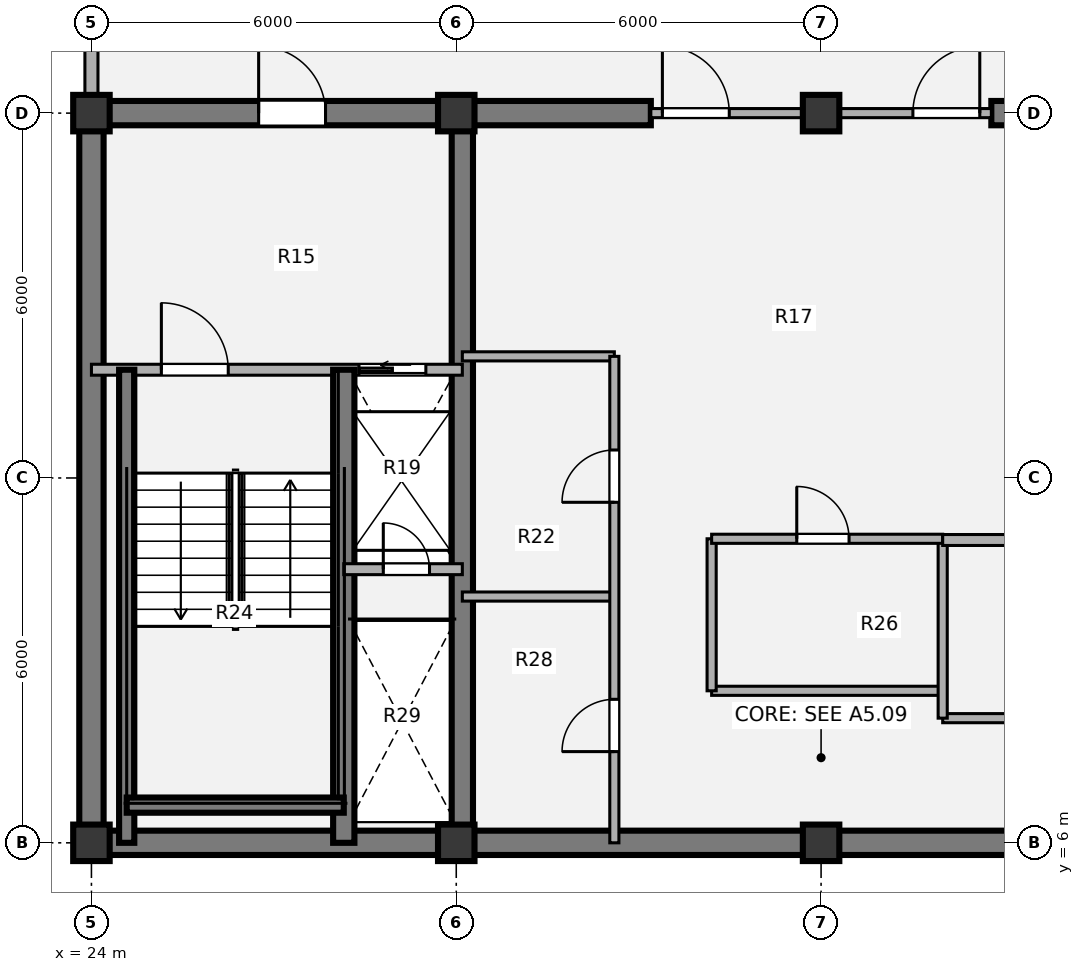
"""IFC4 building model, lengths in metres.
Left out: names, types, materials, properties, quantities, classifications, styles, units other than length and angle.
Written with IfcOpenShell. Run it as: python <this file> out.ifc"""

import sys

from ifc_helpers import new_model, si_unit, direction, frame, frame_2d, origin, origin_2d, place, context, subcontext, project, spatial, rectangle, extrude, source, transform, mapped, element, fill, save


model = new_model("IFC4")
c1 = context("Model", 3, precision=1e-05, world=origin(), true_north=direction((0.0, 1.0)))
c2 = subcontext(c1, "Body", "Model", "MODEL_VIEW")
j1 = project(units=[si_unit("LENGTHUNIT", "METRE"), si_unit("PLANEANGLEUNIT", "RADIAN")], contexts=[c1])
p1 = place(None, origin())
s1 = spatial("IfcSite", under=j1, at=p1, CompositionType="ELEMENT")
p2 = place(p1, origin())
s2 = spatial("IfcBuilding", under=s1, at=p2, CompositionType="ELEMENT")
p3 = place(p2, frame((0.0, 0.0, 279.72)))
s3 = spatial("IfcBuildingStorey", under=s2, at=p3, CompositionType="ELEMENT", Elevation=279.72)
m1 = source(origin(), c2, "Body", "SweptSolid", [
    extrude(rectangle(XDim=0.6, YDim=0.6, at=origin_2d()), origin(), (0.0, 0.0, 1.0), 3.78),
])
for number, where, z_axis, x_axis in (
    (1, (24.0, 6.0, 0.0), (0.0, 0.0, 1.0), (1.0, 0.0, 0.0)),
    (2, (30.0, 6.0, 0.0), (0.0, 0.0, 1.0), (1.0, 0.0, 0.0)),
    (3, (36.0, 6.0, 0.0), (0.0, 0.0, 1.0), (1.0, 0.0, 0.0)),
    (4, (24.0, 18.0, 0.0), (0.0, 0.0, 1.0), (1.0, 0.0, 0.0)),
    (5, (30.0, 18.0, 0.0), (0.0, 0.0, 1.0), (1.0, 0.0, 0.0)),
    (6, (36.0, 18.0, 0.0), (0.0, 0.0, 1.0), (1.0, 0.0, 0.0)),
):
    element("IfcColumn", number, at=place(p3, frame(where, z_axis=z_axis, x_axis=x_axis)), inside=s3, PredefinedType="COLUMN", context=c2, shape_type="MappedRepresentation", body=[
        mapped(m1, transform((0.0, 0.0, 0.0), x_axis=(1.0, 0.0, 0.0), y_axis=(0.0, 1.0, 0.0), z_axis=(0.0, 0.0, 1.0), scale=1.0)),
    ])
p4 = place(p3, frame((48.2, 6.0, 0.0), z_axis=(0.0, 0.0, 1.0), x_axis=(-1.0, 0.0, 0.0)))
e7 = element("IfcWall", 7, at=p4, inside=s3, PredefinedType="SHEAR", context=c2, shape_type="SweptSolid", body=[
    extrude(rectangle(XDim=24.4, YDim=0.4, at=frame_2d((12.2, 0.0))), origin(), (0.0, 0.0, 1.0), 3.78),
])
p5 = place(p3, frame((24.0, 6.0, 0.0), z_axis=(0.0, 0.0, 1.0), x_axis=(0.0, 1.0, 0.0)))
e8 = element("IfcWall", 8, at=p5, inside=s3, PredefinedType="SHEAR", context=c2, shape_type="SweptSolid", body=[
    extrude(rectangle(XDim=12.0, YDim=0.4, at=frame_2d((6.0, 0.0))), origin(), (0.0, 0.0, 1.0), 3.78),
])
p6 = place(p3, frame((23.8, 18.0, 0.0), z_axis=(0.0, 0.0, 1.0), x_axis=(1.0, 0.0, 0.0)))
e9 = element("IfcWall", 9, at=p6, inside=s3, PredefinedType="SHEAR", context=c2, shape_type="SweptSolid", body=[
    extrude(rectangle(XDim=9.4, YDim=0.4, at=frame_2d((4.7, 0.0))), origin(), (0.0, 0.0, 1.0), 3.78),
])
p7 = place(p6, frame((2.95, 0.0, 0.0)))
e10 = element("IfcOpeningElement", 10, at=p7, cuts=e9, PredefinedType="OPENING", context=c2, shape_type="SweptSolid", body=[
    extrude(rectangle(XDim=1.1, YDim=2.1, at=origin_2d()), frame((0.55, 0.21, 1.05), z_axis=(0.0, -1.0, 0.0), x_axis=(1.0, 0.0, 0.0)), (0.0, 0.0, 1.0), 0.42),
])
p8 = place(p3, frame((38.8, 18.0, 0.0), z_axis=(0.0, 0.0, 1.0), x_axis=(1.0, 0.0, 0.0)))
e11 = element("IfcWall", 11, at=p8, inside=s3, PredefinedType="SHEAR", context=c2, shape_type="SweptSolid", body=[
    extrude(rectangle(XDim=9.4, YDim=0.4, at=frame_2d((4.7, 0.0))), origin(), (0.0, 0.0, 1.0), 3.78),
])
p9 = place(p8, frame((5.45, 0.0, 0.0)))
e12 = element("IfcOpeningElement", 12, at=p9, cuts=e11, PredefinedType="OPENING", context=c2, shape_type="SweptSolid", body=[
    extrude(rectangle(XDim=1.1, YDim=2.1, at=origin_2d()), frame((0.55, 0.21, 1.05), z_axis=(0.0, -1.0, 0.0), x_axis=(1.0, 0.0, 0.0)), (0.0, 0.0, 1.0), 0.42),
])
p10 = place(p3, frame((30.1, 6.0, 0.0), z_axis=(0.0, 0.0, 1.0), x_axis=(0.0, 1.0, 0.0)))
e13 = element("IfcWall", 13, at=p10, inside=s3, PredefinedType="SHEAR", context=c2, shape_type="SweptSolid", body=[
    extrude(rectangle(XDim=12.0, YDim=0.35, at=frame_2d((6.0, 0.0))), origin(), (0.0, 0.0, 1.0), 3.78),
])
p11 = place(p3, frame((24.0, 18.28, 0.0), z_axis=(0.0, 0.0, 1.0), x_axis=(0.0, 1.0, 0.0)))
e14 = element("IfcWall", 14, at=p11, inside=s3, PredefinedType="SOLIDWALL", context=c2, shape_type="SweptSolid", body=[
    extrude(rectangle(XDim=2.77, YDim=0.215, at=frame_2d((1.385, 0.0))), origin(), (0.0, 0.0, 1.0), 2.718),
])
p12 = place(p3, frame((30.1, 14.0, 0.0), z_axis=(0.0, 0.0, 1.0), x_axis=(1.0, 0.0, 0.0)))
e15 = element("IfcWall", 15, at=p12, inside=s3, PredefinedType="PARTITIONING", context=c2, shape_type="SweptSolid", body=[
    extrude(rectangle(XDim=2.5, YDim=0.15, at=frame_2d((1.25, 0.0))), origin(), (0.0, 0.0, 1.0), 3.5),
])
p13 = place(p3, frame((34.2, 8.5, 0.0), z_axis=(0.0, 0.0, 1.0), x_axis=(1.0, 0.0, 0.0)))
e16 = element("IfcWall", 16, at=p13, inside=s3, PredefinedType="PARTITIONING", context=c2, shape_type="SweptSolid", body=[
    extrude(rectangle(XDim=3.8, YDim=0.15, at=frame_2d((1.9, 0.0))), origin(), (0.0, 0.0, 1.0), 3.5),
])
p14 = place(p3, frame((38.0, 8.05, 0.0), z_axis=(0.0, 0.0, 1.0), x_axis=(1.0, 0.0, 0.0)))
e17 = element("IfcWall", 17, at=p14, inside=s3, PredefinedType="PARTITIONING", context=c2, shape_type="SweptSolid", body=[
    extrude(rectangle(XDim=3.9, YDim=0.15, at=frame_2d((1.95, 0.0))), origin(), (0.0, 0.0, 1.0), 3.5),
])
p15 = place(p14, frame((1.45, 0.0, 0.0)))
e18 = element("IfcOpeningElement", 18, at=p15, cuts=e17, PredefinedType="OPENING", context=c2, shape_type="SweptSolid", body=[
    extrude(rectangle(XDim=0.86, YDim=2.1, at=origin_2d()), frame((0.43, 0.085, 1.05), z_axis=(0.0, -1.0, 0.0), x_axis=(1.0, 0.0, 0.0)), (0.0, 0.0, 1.0), 0.17),
])
p16 = place(p3, frame((34.2, 8.5, 0.0), z_axis=(0.0, 0.0, 1.0), x_axis=(0.0, 1.0, 0.0)))
e19 = element("IfcWall", 19, at=p16, inside=s3, PredefinedType="PARTITIONING", context=c2, shape_type="SweptSolid", body=[
    extrude(rectangle(XDim=2.5, YDim=0.15, at=frame_2d((1.25, 0.0))), origin(), (0.0, 0.0, 1.0), 3.5),
])
p17 = place(p3, frame((38.0, 8.05, 0.0), z_axis=(0.0, 0.0, 1.0), x_axis=(0.0, 1.0, 0.0)))
e20 = element("IfcWall", 20, at=p17, inside=s3, PredefinedType="PARTITIONING", context=c2, shape_type="SweptSolid", body=[
    extrude(rectangle(XDim=2.95, YDim=0.15, at=frame_2d((1.475, 0.0))), origin(), (0.0, 0.0, 1.0), 3.5),
])
p18 = place(p3, frame((34.2, 11.0, 0.0), z_axis=(0.0, 0.0, 1.0), x_axis=(1.0, 0.0, 0.0)))
e21 = element("IfcWall", 21, at=p18, inside=s3, PredefinedType="PARTITIONING", context=c2, shape_type="SweptSolid", body=[
    extrude(rectangle(XDim=3.8, YDim=0.15, at=frame_2d((1.9, 0.0))), origin(), (0.0, 0.0, 1.0), 3.5),
])
p19 = place(p18, frame((1.4, 0.0, 0.0)))
e22 = element("IfcOpeningElement", 22, at=p19, cuts=e21, PredefinedType="OPENING", context=c2, shape_type="SweptSolid", body=[
    extrude(rectangle(XDim=0.86, YDim=2.1, at=origin_2d()), frame((0.43, 0.085, 1.05), z_axis=(0.0, -1.0, 0.0), x_axis=(1.0, 0.0, 0.0)), (0.0, 0.0, 1.0), 0.17),
])
p20 = place(p3, frame((38.0, 10.98, 0.0), z_axis=(0.0, 0.0, 1.0), x_axis=(1.0, 0.0, 0.0)))
e23 = element("IfcWall", 23, at=p20, inside=s3, PredefinedType="PARTITIONING", context=c2, shape_type="SweptSolid", body=[
    extrude(rectangle(XDim=3.9, YDim=0.18, at=frame_2d((1.95, 0.0))), origin(), (0.0, 0.0, 1.0), 3.5),
])
p21 = place(p3, frame((30.1, 10.05, 0.0), z_axis=(0.0, 0.0, 1.0), x_axis=(1.0, 0.0, 0.0)))
e24 = element("IfcWall", 24, at=p21, inside=s3, PredefinedType="PARTITIONING", context=c2, shape_type="SweptSolid", body=[
    extrude(rectangle(XDim=2.5, YDim=0.15, at=frame_2d((1.25, 0.0))), origin(), (0.0, 0.0, 1.0), 3.5),
])
p22 = place(p3, frame((32.6, 6.0, 0.0), z_axis=(0.0, 0.0, 1.0), x_axis=(0.0, 1.0, 0.0)))
e25 = element("IfcWall", 25, at=p22, inside=s3, PredefinedType="PARTITIONING", context=c2, shape_type="SweptSolid", body=[
    extrude(rectangle(XDim=8.0, YDim=0.15, at=frame_2d((4.0, 0.0))), origin(), (0.0, 0.0, 1.0), 3.5),
])
p23 = place(p22, frame((1.5, 0.0, 0.0)))
e26 = element("IfcOpeningElement", 26, at=p23, cuts=e25, PredefinedType="OPENING", context=c2, shape_type="SweptSolid", body=[
    extrude(rectangle(XDim=0.86, YDim=2.1, at=origin_2d()), frame((0.43, 0.085, 1.05), z_axis=(0.0, -1.0, 0.0), x_axis=(1.0, 0.0, 0.0)), (0.0, 0.0, 1.0), 0.17),
])
p24 = place(p22, frame((5.6, 0.0, 0.0)))
e27 = element("IfcOpeningElement", 27, at=p24, cuts=e25, PredefinedType="OPENING", context=c2, shape_type="SweptSolid", body=[
    extrude(rectangle(XDim=0.86, YDim=2.1, at=origin_2d()), frame((0.43, 0.085, 1.05), z_axis=(0.0, -1.0, 0.0), x_axis=(1.0, 0.0, 0.0)), (0.0, 0.0, 1.0), 0.17),
])
p25 = place(p3, frame((33.2, 18.0, 0.0), z_axis=(0.0, 0.0, 1.0), x_axis=(1.0, 0.0, 0.0)))
e28 = element("IfcWall", 28, at=p25, inside=s3, PredefinedType="PARTITIONING", context=c2, shape_type="SweptSolid", body=[
    extrude(rectangle(XDim=5.6, YDim=0.15, at=frame_2d((2.8, 0.0))), origin(), (0.0, 0.0, 1.0), 2.515),
])
p26 = place(p25, frame((0.19, 0.0, 0.0)))
e29 = element("IfcOpeningElement", 29, at=p26, cuts=e28, PredefinedType="OPENING", context=c2, shape_type="SweptSolid", body=[
    extrude(rectangle(XDim=1.1, YDim=2.1, at=origin_2d()), frame((0.55, 0.085, 1.05), z_axis=(0.0, -1.0, 0.0), x_axis=(1.0, 0.0, 0.0)), (0.0, 0.0, 1.0), 0.17),
])
p27 = place(p25, frame((4.31, 0.0, 0.0)))
e30 = element("IfcOpeningElement", 30, at=p27, cuts=e28, PredefinedType="OPENING", context=c2, shape_type="SweptSolid", body=[
    extrude(rectangle(XDim=1.1, YDim=2.1, at=origin_2d()), frame((0.55, 0.085, 1.05), z_axis=(0.0, -1.0, 0.0), x_axis=(1.0, 0.0, 0.0)), (0.0, 0.0, 1.0), 0.17),
])
p28 = place(p3, frame((24.0, 13.78, 0.0), z_axis=(0.0, 0.0, 1.0), x_axis=(1.0, 0.0, 0.0)))
e31 = element("IfcWall", 31, at=p28, inside=s3, PredefinedType="PARTITIONING", context=c2, shape_type="SweptSolid", body=[
    extrude(rectangle(XDim=6.1, YDim=0.18, at=frame_2d((3.05, 0.0))), origin(), (0.0, 0.0, 1.0), 3.5),
])
p29 = place(p28, frame((1.15, 0.0, 0.0)))
e32 = element("IfcOpeningElement", 32, at=p29, cuts=e31, PredefinedType="OPENING", context=c2, shape_type="SweptSolid", body=[
    extrude(rectangle(XDim=1.1, YDim=2.1, at=origin_2d()), frame((0.55, 0.1, 1.05), z_axis=(0.0, -1.0, 0.0), x_axis=(1.0, 0.0, 0.0)), (0.0, 0.0, 1.0), 0.2),
])
p30 = place(p28, frame((4.4, 0.0, 0.0)))
e33 = element("IfcOpeningElement", 33, at=p30, cuts=e31, PredefinedType="OPENING", context=c2, shape_type="SweptSolid", body=[
    extrude(rectangle(XDim=1.1, YDim=2.1, at=origin_2d()), frame((0.55, 0.1, 1.05), z_axis=(0.0, -1.0, 0.0), x_axis=(1.0, 0.0, 0.0)), (0.0, 0.0, 1.0), 0.2),
])
p31 = place(p3, frame((28.15, 6.0, 0.0), z_axis=(0.0, 0.0, 1.0), x_axis=(0.0, 1.0, 0.0)))
e34 = element("IfcWall", 34, at=p31, inside=s3, PredefinedType="SHEAR", context=c2, shape_type="SweptSolid", body=[
    extrude(rectangle(XDim=7.78, YDim=0.35, at=frame_2d((3.89, 0.0))), origin(), (0.0, 0.0, 1.0), 3.85),
])
p32 = place(p3, frame((24.58, 6.0, 0.0), z_axis=(0.0, 0.0, 1.0), x_axis=(0.0, 1.0, 0.0)))
e35 = element("IfcWall", 35, at=p32, inside=s3, PredefinedType="SHEAR", context=c2, shape_type="SweptSolid", body=[
    extrude(rectangle(XDim=7.78, YDim=0.25, at=frame_2d((3.89, 0.0))), origin(), (0.0, 0.0, 1.0), 3.85),
])
p33 = place(p3, frame((24.58, 6.62, 0.0), z_axis=(0.0, 0.0, 1.0), x_axis=(1.0, 0.0, 0.0)))
e36 = element("IfcWall", 36, at=p33, inside=s3, PredefinedType="SHEAR", context=c2, shape_type="SweptSolid", body=[
    extrude(rectangle(XDim=3.57, YDim=0.25, at=frame_2d((1.785, 0.0))), origin(), (0.0, 0.0, 1.0), 3.85),
])
p34 = place(p3, frame((28.15, 10.5, 0.0), z_axis=(0.0, 0.0, 1.0), x_axis=(1.0, 0.0, 0.0)))
e37 = element("IfcWall", 37, at=p34, inside=s3, PredefinedType="PARTITIONING", context=c2, shape_type="SweptSolid", body=[
    extrude(rectangle(XDim=1.95, YDim=0.18, at=frame_2d((0.975, 0.0))), origin(), (0.0, 0.0, 1.0), 3.5),
])
p35 = place(p34, frame((0.65, 0.0, 0.0)))
e38 = element("IfcOpeningElement", 38, at=p35, cuts=e37, PredefinedType="OPENING", context=c2, shape_type="SweptSolid", body=[
    extrude(rectangle(XDim=0.76, YDim=2.05, at=origin_2d()), frame((0.38, 0.1, 1.025), z_axis=(0.0, -1.0, 0.0), x_axis=(1.0, 0.0, 0.0)), (0.0, 0.0, 1.0), 0.2),
])
m2 = source(origin(), c2, "Body", "SweptSolid", [
    extrude(rectangle(XDim=0.86, YDim=2.1, at=origin_2d()), frame((0.43, 0.025, 1.05), z_axis=(0.0, -1.0, 0.0), x_axis=(1.0, 0.0, 0.0)), (0.0, 0.0, 1.0), 0.05),
])
p36 = place(p19, origin())
e39 = element("IfcDoor", 39, at=p36, inside=s3, OperationType="SINGLE_SWING_LEFT", PredefinedType="DOOR", context=c2, shape_type="MappedRepresentation", body=[
    mapped(m2, transform((0.0, 0.0, 0.0), x_axis=(1.0, 0.0, 0.0), y_axis=(0.0, 1.0, 0.0), z_axis=(0.0, 0.0, 1.0), scale=1.0)),
])
fill(e22, e39)
p37 = place(p23, origin())
e40 = element("IfcDoor", 40, at=p37, inside=s3, OperationType="SINGLE_SWING_LEFT", PredefinedType="DOOR", context=c2, shape_type="MappedRepresentation", body=[
    mapped(m2, transform((0.0, 0.0, 0.0), x_axis=(1.0, 0.0, 0.0), y_axis=(0.0, 1.0, 0.0), z_axis=(0.0, 0.0, 1.0), scale=1.0)),
])
fill(e26, e40)
p38 = place(p24, origin())
e41 = element("IfcDoor", 41, at=p38, inside=s3, OperationType="SINGLE_SWING_LEFT", PredefinedType="DOOR", context=c2, shape_type="MappedRepresentation", body=[
    mapped(m2, transform((0.0, 0.0, 0.0), x_axis=(1.0, 0.0, 0.0), y_axis=(0.0, 1.0, 0.0), z_axis=(0.0, 0.0, 1.0), scale=1.0)),
])
fill(e27, e41)
m3 = source(origin(), c2, "Body", "SweptSolid", [
    extrude(rectangle(XDim=1.1, YDim=2.1, at=origin_2d()), frame((0.55, 0.025, 1.05), z_axis=(0.0, -1.0, 0.0), x_axis=(1.0, 0.0, 0.0)), (0.0, 0.0, 1.0), 0.05),
])
p39 = place(p26, origin())
e42 = element("IfcDoor", 42, at=p39, inside=s3, OperationType="SINGLE_SWING_LEFT", PredefinedType="DOOR", context=c2, shape_type="MappedRepresentation", body=[
    mapped(m3, transform((0.0, 0.0, 0.0), x_axis=(1.0, 0.0, 0.0), y_axis=(0.0, 1.0, 0.0), z_axis=(0.0, 0.0, 1.0), scale=1.0)),
])
fill(e29, e42)
p40 = place(p27, origin())
e43 = element("IfcDoor", 43, at=p40, inside=s3, OperationType="SINGLE_SWING_RIGHT", PredefinedType="DOOR", context=c2, shape_type="MappedRepresentation", body=[
    mapped(m3, transform((0.0, 0.0, 0.0), x_axis=(1.0, 0.0, 0.0), y_axis=(0.0, 1.0, 0.0), z_axis=(0.0, 0.0, 1.0), scale=1.0)),
])
fill(e30, e43)
m4 = source(origin(), c2, "Body", "SweptSolid", [
    extrude(rectangle(XDim=1.1, YDim=2.1, at=origin_2d()), frame((0.55, 0.025, 1.05), z_axis=(0.0, -1.0, 0.0), x_axis=(1.0, 0.0, 0.0)), (0.0, 0.0, 1.0), 0.05),
])
p41 = place(p29, origin())
e44 = element("IfcDoor", 44, at=p41, inside=s3, OperationType="SINGLE_SWING_LEFT", PredefinedType="DOOR", context=c2, shape_type="MappedRepresentation", body=[
    mapped(m4, transform((0.0, 0.0, 0.0), x_axis=(1.0, 0.0, 0.0), y_axis=(0.0, 1.0, 0.0), z_axis=(0.0, 0.0, 1.0), scale=1.0)),
])
fill(e32, e44)
m5 = source(origin(), c2, "Body", "SweptSolid", [
    extrude(rectangle(XDim=1.1, YDim=2.1, at=origin_2d()), frame((0.55, 0.025, 1.05), z_axis=(0.0, -1.0, 0.0), x_axis=(1.0, 0.0, 0.0)), (0.0, 0.0, 1.0), 0.05),
])
p42 = place(p30, origin())
e45 = element("IfcDoor", 45, at=p42, inside=s3, OperationType="SLIDING_TO_LEFT", PredefinedType="DOOR", context=c2, shape_type="MappedRepresentation", body=[
    mapped(m5, transform((0.0, 0.0, 0.0), x_axis=(1.0, 0.0, 0.0), y_axis=(0.0, 1.0, 0.0), z_axis=(0.0, 0.0, 1.0), scale=1.0)),
])
fill(e33, e45)
m6 = source(origin(), c2, "Body", "SweptSolid", [
    extrude(rectangle(XDim=0.76, YDim=2.05, at=origin_2d()), frame((0.38, 0.025, 1.025), z_axis=(0.0, -1.0, 0.0), x_axis=(1.0, 0.0, 0.0)), (0.0, 0.0, 1.0), 0.05),
])
p43 = place(p35, origin())
e46 = element("IfcDoor", 46, at=p43, inside=s3, OperationType="SINGLE_SWING_LEFT", PredefinedType="DOOR", context=c2, shape_type="MappedRepresentation", body=[
    mapped(m6, transform((0.0, 0.0, 0.0), x_axis=(1.0, 0.0, 0.0), y_axis=(0.0, 1.0, 0.0), z_axis=(0.0, 0.0, 1.0), scale=1.0)),
])
fill(e38, e46)
p44 = place(p7, origin())
e47 = element("IfcDoor", 47, at=p44, inside=s3, OperationType="SINGLE_SWING_LEFT", PredefinedType="DOOR", context=c2, shape_type="MappedRepresentation", body=[
    mapped(m3, transform((0.0, 0.0, 0.0), x_axis=(1.0, 0.0, 0.0), y_axis=(0.0, 1.0, 0.0), z_axis=(0.0, 0.0, 1.0), scale=1.0)),
])
fill(e10, e47)
save(model, sys.argv[1])
